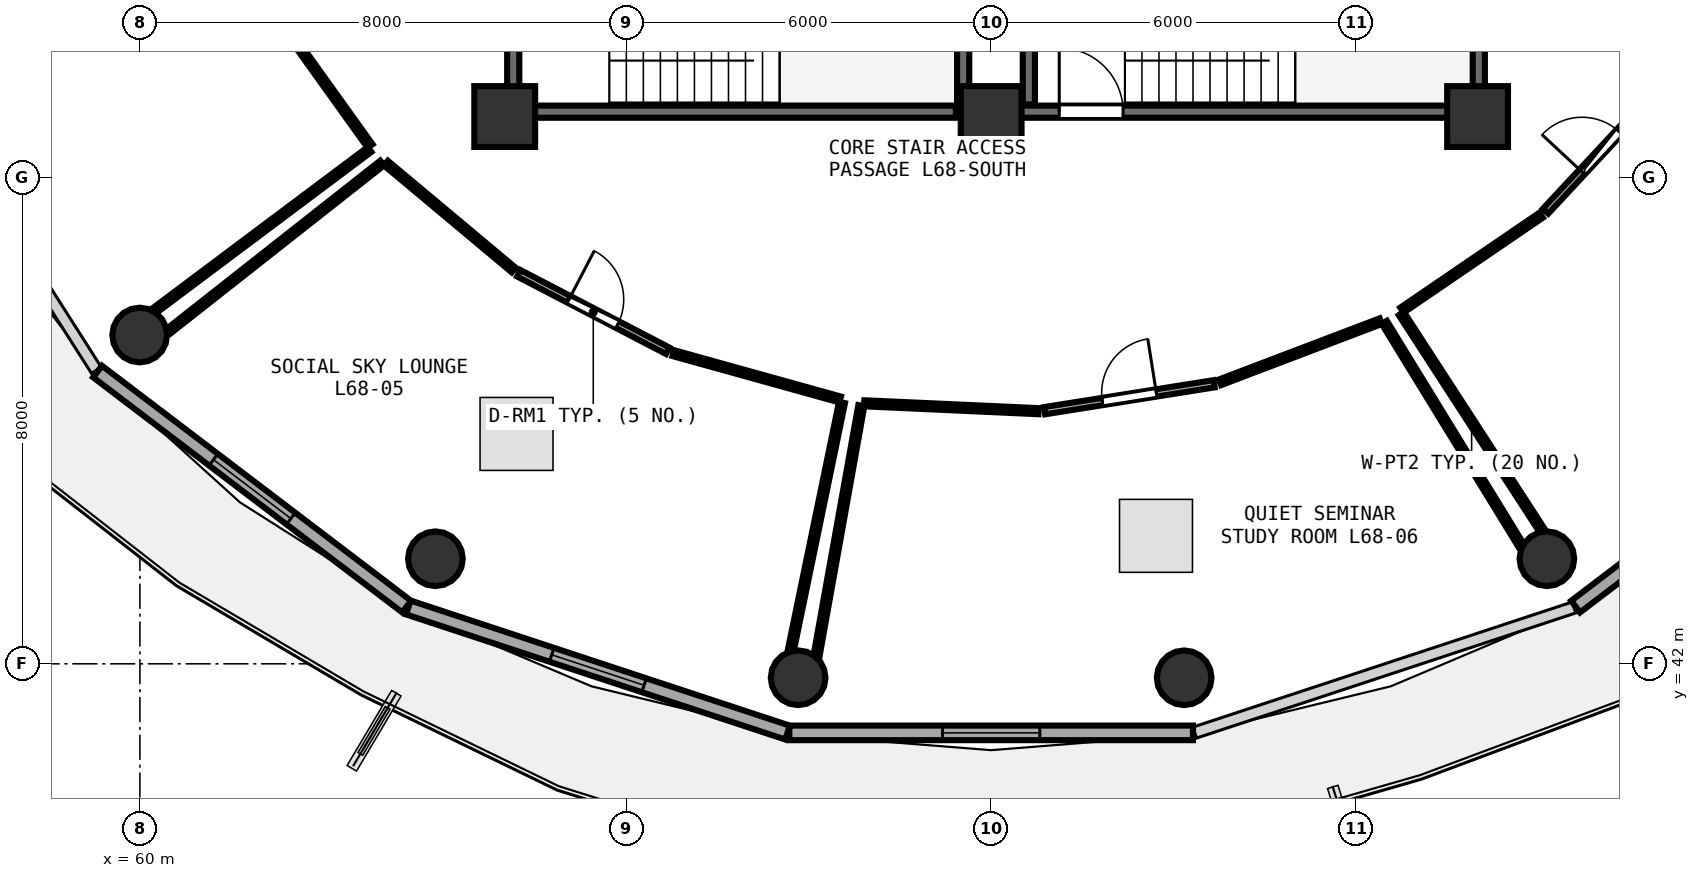
"""IFC4 building model, lengths in metres.
Left out: names, types, materials, properties, quantities, classifications, styles, units other than length and angle.
Written with IfcOpenShell. Run it as: python <this file> out.ifc"""

import sys

from ifc_helpers import new_model, si_unit, direction, frame, frame_2d, origin, origin_2d, place, context, subcontext, project, spatial, rectangle, circle, extrude, element, fill, save


model = new_model("IFC4")
c1 = context("Model", 3, precision=1e-05, world=origin(), true_north=direction((0.0, 1.0)))
c2 = subcontext(c1, "Body", "Model", "MODEL_VIEW")
j1 = project(units=[si_unit("LENGTHUNIT", "METRE"), si_unit("PLANEANGLEUNIT", "RADIAN")], contexts=[c1])
p1 = place(None, origin())
s1 = spatial("IfcSite", under=j1, at=p1, CompositionType="ELEMENT")
p2 = place(p1, origin())
s2 = spatial("IfcBuilding", under=s1, at=p2, CompositionType="ELEMENT")
p3 = place(p2, frame((0.0, 0.0, 267.45)))
s3 = spatial("IfcBuildingStorey", under=s2, at=p3, CompositionType="ELEMENT", Elevation=267.45)
for number, where, z_axis, x_axis in (
    (1, (66.0, 51.0, 0.0), (0.0, 0.0, 1.0), (1.0, 0.0, 0.0)),
    (2, (74.0, 51.0, 0.0), (0.0, 0.0, 1.0), (1.0, 0.0, 0.0)),
    (3, (82.0, 51.0, 0.0), (0.0, 0.0, 1.0), (1.0, 0.0, 0.0)),
):
    element("IfcColumn", number, at=place(p3, frame(where, z_axis=z_axis, x_axis=x_axis)), inside=s3, PredefinedType="PILASTER", context=c2, shape_type="SweptSolid", body=[
        extrude(rectangle(XDim=1.0, YDim=1.0, at=origin_2d()), origin(), (0.0, 0.0, 1.0), 3.75),
    ])
for number, where, z_axis, x_axis in (
    (4, (59.997, 47.407, 0.0), (0.0, 0.0, 1.0), (1.0, 0.0, 0.0)),
    (5, (64.86, 43.728, 0.0), (0.0, 0.0, 1.0), (1.0, 0.0, 0.0)),
    (6, (70.826, 41.771, 0.0), (0.0, 0.0, 1.0), (1.0, 0.0, 0.0)),
    (7, (77.174, 41.771, 0.0), (0.0, 0.0, 1.0), (1.0, 0.0, 0.0)),
    (8, (83.14, 43.728, 0.0), (0.0, 0.0, 1.0), (1.0, 0.0, 0.0)),
):
    element("IfcColumn", number, at=place(p3, frame(where, z_axis=z_axis, x_axis=x_axis)), inside=s3, PredefinedType="COLUMN", context=c2, shape_type="SweptSolid", body=[
        extrude(circle(Radius=0.45, at=origin_2d()), origin(), (0.0, 0.0, 1.0), 3.75),
    ])
p4 = place(p3, frame((59.304, 46.806, 0.0), z_axis=(0.0, 0.0, 1.0), x_axis=(0.796010444211, -0.605282886514, 0.0)))
e9 = element("IfcWall", 9, at=p4, inside=s3, PredefinedType="SOLIDWALL", context=c2, shape_type="SweptSolid", body=[
    extrude(rectangle(XDim=6.387, YDim=0.24, at=frame_2d((3.194, 0.0))), origin(), (0.0, 0.0, 1.0), 3.475),
])
p5 = place(p4, frame((2.394, 0.0, 0.85)))
e10 = element("IfcOpeningElement", 10, at=p5, cuts=e9, PredefinedType="OPENING", context=c2, shape_type="SweptSolid", body=[
    extrude(rectangle(XDim=1.6, YDim=1.45, at=frame_2d((0.8, 0.725))), frame((0.0, 0.13, 0.0), z_axis=(0.0, -1.0, 0.0), x_axis=(1.0, 0.0, 0.0)), (0.0, 0.0, 1.0), 0.26),
])
p6 = place(p3, frame((64.414, 42.927, 0.0), z_axis=(0.0, 0.0, 1.0), x_axis=(0.949663708393, -0.313271193954, 0.0)))
e11 = element("IfcWall", 11, at=p6, inside=s3, PredefinedType="SOLIDWALL", context=c2, shape_type="SweptSolid", body=[
    extrude(rectangle(XDim=6.568, YDim=0.24, at=frame_2d((3.284, 0.0))), origin(), (0.0, 0.0, 1.0), 3.475),
])
p7 = place(p6, frame((2.484, 0.0, 0.85)))
e12 = element("IfcOpeningElement", 12, at=p7, cuts=e11, PredefinedType="OPENING", context=c2, shape_type="SweptSolid", body=[
    extrude(rectangle(XDim=1.6, YDim=1.45, at=frame_2d((0.8, 0.725))), frame((0.0, 0.13, 0.0), z_axis=(0.0, -1.0, 0.0), x_axis=(1.0, 0.0, 0.0)), (0.0, 0.0, 1.0), 0.26),
])
p8 = place(p3, frame((70.681, 40.864, 0.0), z_axis=(0.0, 0.0, 1.0), x_axis=(1.0, 0.0, 0.0)))
e13 = element("IfcWall", 13, at=p8, inside=s3, PredefinedType="SOLIDWALL", context=c2, shape_type="SweptSolid", body=[
    extrude(rectangle(XDim=6.638, YDim=0.24, at=frame_2d((3.319, 0.0))), origin(), (0.0, 0.0, 1.0), 3.475),
])
p9 = place(p8, frame((2.519, 0.0, 0.85)))
e14 = element("IfcOpeningElement", 14, at=p9, cuts=e13, PredefinedType="OPENING", context=c2, shape_type="SweptSolid", body=[
    extrude(rectangle(XDim=1.6, YDim=1.45, at=frame_2d((0.8, 0.725))), frame((0.0, 0.13, 0.0), z_axis=(0.0, -1.0, 0.0), x_axis=(1.0, 0.0, 0.0)), (0.0, 0.0, 1.0), 0.26),
])
p10 = place(p3, frame((83.612, 42.94, 0.0), z_axis=(0.0, 0.0, 1.0), x_axis=(0.796010444211, 0.605282886514, 0.0)))
e15 = element("IfcWall", 15, at=p10, inside=s3, PredefinedType="SOLIDWALL", context=c2, shape_type="SweptSolid", body=[
    extrude(rectangle(XDim=6.387, YDim=0.24, at=frame_2d((3.194, 0.0))), origin(), (0.0, 0.0, 1.0), 3.475),
])
p11 = place(p10, frame((2.394, 0.0, 0.85)))
e16 = element("IfcOpeningElement", 16, at=p11, cuts=e15, PredefinedType="OPENING", context=c2, shape_type="SweptSolid", body=[
    extrude(rectangle(XDim=1.6, YDim=1.45, at=frame_2d((0.8, 0.725))), frame((0.0, 0.13, 0.0), z_axis=(0.0, -1.0, 0.0), x_axis=(1.0, 0.0, 0.0)), (0.0, 0.0, 1.0), 0.26),
])
p12 = place(p3, frame((74.0, 51.08, 0.0), z_axis=(0.0, 0.0, 1.0), x_axis=(1.0, 0.0, 0.0)))
e17 = element("IfcWall", 17, at=p12, inside=s3, PredefinedType="SHEAR", context=c2, shape_type="SweptSolid", body=[
    extrude(rectangle(XDim=7.9, YDim=0.2, at=frame_2d((3.95, 0.0))), origin(), (0.0, 0.0, 1.0), 3.49),
])
p13 = place(p12, frame((1.12, 0.0, 0.0)))
e18 = element("IfcOpeningElement", 18, at=p13, cuts=e17, PredefinedType="OPENING", context=c2, shape_type="SweptSolid", body=[
    extrude(rectangle(XDim=1.05, YDim=2.1, at=frame_2d((0.525, 1.05))), frame((0.0, 0.11, 0.0), z_axis=(0.0, -1.0, 0.0), x_axis=(1.0, 0.0, 0.0)), (0.0, 0.0, 1.0), 0.22),
])
for number, where, z_axis, x_axis in (
    (19, (82.02, 51.2, 0.0), (0.0, 0.0, 1.0), (0.0, 1.0, 0.0)),
    (20, (74.62, 54.27, 0.0), (0.0, 0.0, 1.0), (0.0, -1.0, 0.0)),
):
    element("IfcWall", number, at=place(p3, frame(where, z_axis=z_axis, x_axis=x_axis)), inside=s3, PredefinedType="SHEAR", context=c2, shape_type="SweptSolid", body=[
        extrude(rectangle(XDim=3.07, YDim=0.2, at=frame_2d((1.535, 0.0))), origin(), (0.0, 0.0, 1.0), 3.49),
    ])
p14 = place(p3, frame((66.26, 51.08, 0.0), z_axis=(0.0, 0.0, 1.0), x_axis=(1.0, 0.0, 0.0)))
e21 = element("IfcWall", 21, at=p14, inside=s3, PredefinedType="SHEAR", context=c2, shape_type="SweptSolid", body=[
    extrude(rectangle(XDim=7.16, YDim=0.2, at=frame_2d((3.58, 0.0))), origin(), (0.0, 0.0, 1.0), 3.49),
])
p15 = place(p3, frame((73.54, 51.2, 0.0), z_axis=(0.0, 0.0, 1.0), x_axis=(0.0, 1.0, 0.0)))
e22 = element("IfcWall", 22, at=p15, inside=s3, PredefinedType="SHEAR", context=c2, shape_type="SweptSolid", body=[
    extrude(rectangle(XDim=3.07, YDim=0.2, at=frame_2d((1.535, 0.0))), origin(), (0.0, 0.0, 1.0), 3.49),
])
p16 = place(p3, frame((66.14, 54.27, 0.0), z_axis=(0.0, 0.0, 1.0), x_axis=(0.0, -1.0, 0.0)))
e23 = element("IfcWall", 23, at=p16, inside=s3, PredefinedType="SHEAR", context=c2, shape_type="SweptSolid", body=[
    extrude(rectangle(XDim=3.07, YDim=0.2, at=frame_2d((1.535, 0.0))), origin(), (0.0, 0.0, 1.0), 3.49),
])
p17 = place(p16, frame((1.01, 0.0, 0.0)))
e24 = element("IfcOpeningElement", 24, at=p17, cuts=e23, PredefinedType="OPENING", context=c2, shape_type="SweptSolid", body=[
    extrude(rectangle(XDim=1.05, YDim=2.1, at=frame_2d((0.525, 1.05))), frame((0.0, 0.11, 0.0), z_axis=(0.0, -1.0, 0.0), x_axis=(1.0, 0.0, 0.0)), (0.0, 0.0, 1.0), 0.22),
])
p18 = place(p3, frame((66.232, 48.422, 0.0), z_axis=(0.0, 0.0, 1.0), x_axis=(0.887021247279, -0.461728607382, 0.0)))
e25 = element("IfcWall", 25, at=p18, inside=s3, PredefinedType="PARTITIONING", context=c2, shape_type="SweptSolid", body=[
    extrude(rectangle(XDim=2.761, YDim=0.12, at=frame_2d((1.38, 0.0))), origin(), (0.0, 0.0, 1.0), 3.235),
])
p19 = place(p18, frame((0.93, 0.0, 0.0)))
e26 = element("IfcOpeningElement", 26, at=p19, cuts=e25, PredefinedType="OPENING", context=c2, shape_type="SweptSolid", body=[
    extrude(rectangle(XDim=0.9, YDim=2.08, at=frame_2d((0.45, 1.04))), frame((0.0, 0.07, 0.0), z_axis=(0.0, -1.0, 0.0), x_axis=(1.0, 0.0, 0.0)), (0.0, 0.0, 1.0), 0.14),
])
p20 = place(p3, frame((74.878, 46.162, 0.0), z_axis=(0.0, 0.0, 1.0), x_axis=(0.987593415231, 0.157032627796, 0.0)))
e27 = element("IfcWall", 27, at=p20, inside=s3, PredefinedType="PARTITIONING", context=c2, shape_type="SweptSolid", body=[
    extrude(rectangle(XDim=2.823, YDim=0.12, at=frame_2d((1.412, 0.0))), origin(), (0.0, 0.0, 1.0), 3.075),
])
p21 = place(p20, frame((0.962, 0.0, 0.0)))
e28 = element("IfcOpeningElement", 28, at=p21, cuts=e27, PredefinedType="OPENING", context=c2, shape_type="SweptSolid", body=[
    extrude(rectangle(XDim=0.9, YDim=2.08, at=frame_2d((0.45, 1.04))), frame((0.0, 0.07, 0.0), z_axis=(0.0, -1.0, 0.0), x_axis=(1.0, 0.0, 0.0)), (0.0, 0.0, 1.0), 0.14),
])
p22 = place(p3, frame((83.118, 49.443, 0.0), z_axis=(0.0, 0.0, 1.0), x_axis=(0.681315269885, 0.731990097625, 0.0)))
e29 = element("IfcWall", 29, at=p22, inside=s3, PredefinedType="PARTITIONING", context=c2, shape_type="SweptSolid", body=[
    extrude(rectangle(XDim=2.664, YDim=0.12, at=frame_2d((1.332, 0.0))), origin(), (0.0, 0.0, 1.0), 3.075),
])
p23 = place(p22, frame((0.882, 0.0, 0.0)))
e30 = element("IfcOpeningElement", 30, at=p23, cuts=e29, PredefinedType="OPENING", context=c2, shape_type="SweptSolid", body=[
    extrude(rectangle(XDim=0.9, YDim=2.08, at=frame_2d((0.45, 1.04))), frame((0.0, 0.07, 0.0), z_axis=(0.0, -1.0, 0.0), x_axis=(1.0, 0.0, 0.0)), (0.0, 0.0, 1.0), 0.14),
])
p24 = place(p3, frame((62.23, 52.684, 0.0), z_axis=(0.0, 0.0, 1.0), x_axis=(0.582725386778, -0.812669135383, 0.0)))
e31 = element("IfcWall", 31, at=p24, inside=s3, PredefinedType="PARTITIONING", context=c2, shape_type="SweptSolid", body=[
    extrude(rectangle(XDim=2.669, YDim=0.1, at=frame_2d((1.334, 0.0))), origin(), (0.0, 0.0, 1.0), 3.075),
])
p25 = place(p3, frame((63.777, 50.458, 0.0), z_axis=(0.0, 0.0, 1.0), x_axis=(-0.800384816546, -0.599486568191, 0.0)))
e32 = element("IfcWall", 32, at=p25, inside=s3, PredefinedType="PARTITIONING", context=c2, shape_type="SweptSolid", body=[
    extrude(rectangle(XDim=4.414, YDim=0.1, at=frame_2d((2.207, 0.0))), origin(), (0.0, 0.0, 1.0), 3.175),
])
p26 = place(p3, frame((64.046, 50.234, 0.0), z_axis=(0.0, 0.0, 1.0), x_axis=(0.767022676895, -0.641619991216, 0.0)))
e33 = element("IfcWall", 33, at=p26, inside=s3, PredefinedType="PARTITIONING", context=c2, shape_type="SweptSolid", body=[
    extrude(rectangle(XDim=2.741, YDim=0.1, at=frame_2d((1.371, 0.0))), origin(), (0.0, 0.0, 1.0), 3.075),
])
p27 = place(p3, frame((68.772, 47.109, 0.0), z_axis=(0.0, 0.0, 1.0), x_axis=(0.963478601256, -0.267785333659, 0.0)))
e34 = element("IfcWall", 34, at=p27, inside=s3, PredefinedType="PARTITIONING", context=c2, shape_type="SweptSolid", body=[
    extrude(rectangle(XDim=2.848, YDim=0.1, at=frame_2d((1.424, 0.0))), origin(), (0.0, 0.0, 1.0), 3.48),
])
p28 = place(p3, frame((71.547, 46.297, 0.0), z_axis=(0.0, 0.0, 1.0), x_axis=(-0.202308141573, -0.979321916355, 0.0)))
e35 = element("IfcWall", 35, at=p28, inside=s3, PredefinedType="PARTITIONING", context=c2, shape_type="SweptSolid", body=[
    extrude(rectangle(XDim=4.153, YDim=0.1, at=frame_2d((2.076, 0.0))), origin(), (0.0, 0.0, 1.0), 3.175),
])
p29 = place(p3, frame((60.468, 47.468, 0.0), z_axis=(0.0, 0.0, 1.0), x_axis=(0.785736749878, 0.618561039745, 0.0)))
e36 = element("IfcWall", 36, at=p29, inside=s3, PredefinedType="PARTITIONING", context=c2, shape_type="SweptSolid", body=[
    extrude(rectangle(XDim=4.475, YDim=0.1, at=frame_2d((2.237, 0.0))), origin(), (0.0, 0.0, 1.0), 3.075),
])
p30 = place(p3, frame((71.912, 46.284, 0.0), z_axis=(0.0, 0.0, 1.0), x_axis=(0.998983047325, -0.045087372484, 0.0)))
e37 = element("IfcWall", 37, at=p30, inside=s3, PredefinedType="PARTITIONING", context=c2, shape_type="SweptSolid", body=[
    extrude(rectangle(XDim=2.87, YDim=0.1, at=frame_2d((1.435, 0.0))), origin(), (0.0, 0.0, 1.0), 3.075),
])
p31 = place(p3, frame((77.763, 46.629, 0.0), z_axis=(0.0, 0.0, 1.0), x_axis=(0.934691278896, 0.355460564839, 0.0)))
e38 = element("IfcWall", 38, at=p31, inside=s3, PredefinedType="PARTITIONING", context=c2, shape_type="SweptSolid", body=[
    extrude(rectangle(XDim=2.829, YDim=0.1, at=frame_2d((1.415, 0.0))), origin(), (0.0, 0.0, 1.0), 3.48),
])
p32 = place(p3, frame((80.466, 47.615, 0.0), z_axis=(0.0, 0.0, 1.0), x_axis=(0.522784059663, -0.852465147066, 0.0)))
e39 = element("IfcWall", 39, at=p32, inside=s3, PredefinedType="PARTITIONING", context=c2, shape_type="SweptSolid", body=[
    extrude(rectangle(XDim=4.306, YDim=0.1, at=frame_2d((2.153, 0.0))), origin(), (0.0, 0.0, 1.0), 3.175),
])
p33 = place(p3, frame((71.129, 42.136, 0.0), z_axis=(0.0, 0.0, 1.0), x_axis=(0.176199339585, 0.984354505618, 0.0)))
e40 = element("IfcWall", 40, at=p33, inside=s3, PredefinedType="PARTITIONING", context=c2, shape_type="SweptSolid", body=[
    extrude(rectangle(XDim=4.176, YDim=0.1, at=frame_2d((2.088, 0.0))), origin(), (0.0, 0.0, 1.0), 3.075),
])
p34 = place(p3, frame((80.757, 47.816, 0.0), z_axis=(0.0, 0.0, 1.0), x_axis=(0.826087380575, 0.563542047814, 0.0)))
e41 = element("IfcWall", 41, at=p34, inside=s3, PredefinedType="PARTITIONING", context=c2, shape_type="SweptSolid", body=[
    extrude(rectangle(XDim=2.768, YDim=0.1, at=frame_2d((1.384, 0.0))), origin(), (0.0, 0.0, 1.0), 3.075),
])
p35 = place(p3, frame((83.058, 44.196, 0.0), z_axis=(0.0, 0.0, 1.0), x_axis=(-0.544234825024, 0.838932926539, 0.0)))
e42 = element("IfcWall", 42, at=p35, inside=s3, PredefinedType="PARTITIONING", context=c2, shape_type="SweptSolid", body=[
    extrude(rectangle(XDim=4.249, YDim=0.1, at=frame_2d((2.125, 0.0))), origin(), (0.0, 0.0, 1.0), 3.075),
])
p36 = place(p5, origin())
e43 = element("IfcWindow", 43, at=p36, inside=s3, PartitioningType="SINGLE_PANEL", PredefinedType="WINDOW", context=c2, shape_type="SweptSolid", body=[
    extrude(rectangle(XDim=1.6, YDim=1.45, at=frame_2d((0.8, 0.725))), frame((0.0, 0.03, 0.0), z_axis=(0.0, -1.0, 0.0), x_axis=(1.0, 0.0, 0.0)), (0.0, 0.0, 1.0), 0.06),
])
fill(e10, e43)
p37 = place(p7, origin())
e44 = element("IfcWindow", 44, at=p37, inside=s3, PartitioningType="SINGLE_PANEL", PredefinedType="WINDOW", context=c2, shape_type="SweptSolid", body=[
    extrude(rectangle(XDim=1.6, YDim=1.45, at=frame_2d((0.8, 0.725))), frame((0.0, 0.03, 0.0), z_axis=(0.0, -1.0, 0.0), x_axis=(1.0, 0.0, 0.0)), (0.0, 0.0, 1.0), 0.06),
])
fill(e12, e44)
p38 = place(p9, origin())
e45 = element("IfcWindow", 45, at=p38, inside=s3, PartitioningType="SINGLE_PANEL", PredefinedType="WINDOW", context=c2, shape_type="SweptSolid", body=[
    extrude(rectangle(XDim=1.6, YDim=1.45, at=frame_2d((0.8, 0.725))), frame((0.0, 0.03, 0.0), z_axis=(0.0, -1.0, 0.0), x_axis=(1.0, 0.0, 0.0)), (0.0, 0.0, 1.0), 0.06),
])
fill(e14, e45)
p39 = place(p13, origin())
e46 = element("IfcDoor", 46, at=p39, inside=s3, OperationType="SINGLE_SWING_LEFT", PredefinedType="DOOR", context=c2, shape_type="SweptSolid", body=[
    extrude(rectangle(XDim=1.05, YDim=2.1, at=frame_2d((0.525, 1.05))), frame((0.0, 0.025, 0.0), z_axis=(0.0, -1.0, 0.0), x_axis=(1.0, 0.0, 0.0)), (0.0, 0.0, 1.0), 0.05),
])
fill(e18, e46)
p40 = place(p19, origin())
e47 = element("IfcDoor", 47, at=p40, inside=s3, OperationType="SINGLE_SWING_LEFT", PredefinedType="DOOR", context=c2, shape_type="SweptSolid", body=[
    extrude(rectangle(XDim=0.9, YDim=2.08, at=frame_2d((0.45, 1.04))), frame((0.0, 0.025, 0.0), z_axis=(0.0, -1.0, 0.0), x_axis=(1.0, 0.0, 0.0)), (0.0, 0.0, 1.0), 0.05),
])
fill(e26, e47)
p41 = place(p21, origin())
e48 = element("IfcDoor", 48, at=p41, inside=s3, OperationType="SINGLE_SWING_RIGHT", PredefinedType="DOOR", context=c2, shape_type="SweptSolid", body=[
    extrude(rectangle(XDim=0.9, YDim=2.08, at=frame_2d((0.45, 1.04))), frame((0.0, 0.025, 0.0), z_axis=(0.0, -1.0, 0.0), x_axis=(1.0, 0.0, 0.0)), (0.0, 0.0, 1.0), 0.05),
])
fill(e28, e48)
p42 = place(p23, origin())
e49 = element("IfcDoor", 49, at=p42, inside=s3, OperationType="SINGLE_SWING_LEFT", PredefinedType="DOOR", context=c2, shape_type="SweptSolid", body=[
    extrude(rectangle(XDim=0.9, YDim=2.08, at=frame_2d((0.45, 1.04))), frame((0.0, 0.025, 0.0), z_axis=(0.0, -1.0, 0.0), x_axis=(1.0, 0.0, 0.0)), (0.0, 0.0, 1.0), 0.05),
])
fill(e30, e49)
save(model, sys.argv[1])
